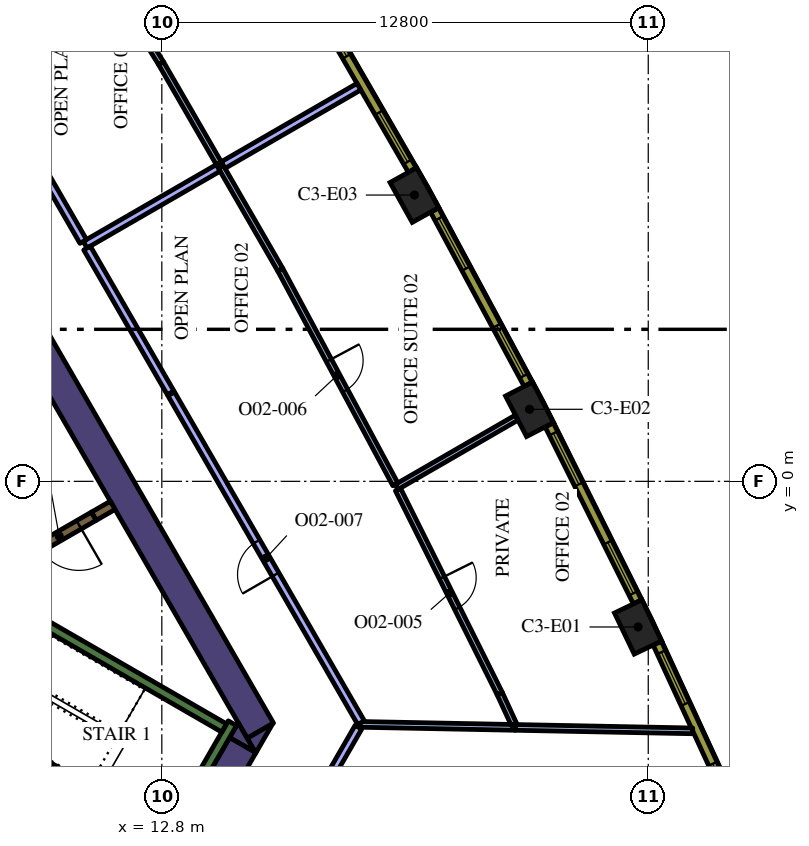
"""IFC4 building model, lengths in metres.
Left out: names, types, materials, properties, quantities, classifications, styles, units other than length and angle.
Written with IfcOpenShell. Run it as: python <this file> out.ifc"""

import sys

from ifc_helpers import new_model, si_unit, direction, frame, frame_2d, origin, origin_2d, place, context, subcontext, project, spatial, polyline, rectangle, outline, extrude, element, fill, save


model = new_model("IFC4")
c1 = context("Model", 3, precision=1e-05, world=origin(), true_north=direction((0.0, 1.0)))
c2 = subcontext(c1, "Body", "Model", "MODEL_VIEW")
j1 = project(units=[si_unit("LENGTHUNIT", "METRE"), si_unit("PLANEANGLEUNIT", "RADIAN")], contexts=[c1])
p1 = place(None, origin())
s1 = spatial("IfcSite", under=j1, at=p1, CompositionType="ELEMENT")
p2 = place(p1, origin())
s2 = spatial("IfcBuilding", under=s1, at=p2, CompositionType="ELEMENT")
p3 = place(p2, frame((0.0, 0.0, 158.4)))
s3 = spatial("IfcBuildingStorey", under=s2, at=p3, CompositionType="ELEMENT", Elevation=158.4)
for number, where, z_axis, x_axis in (
    (1, (25.332, -3.832, 0.0), (0.0, 0.0, 1.0), (-0.433, 0.902, 0.0)),
    (2, (22.476, 1.896, 0.0), (0.0, 0.0, 1.0), (-0.46, 0.888, 0.0)),
    (3, (19.447, 7.533, 0.0), (0.0, 0.0, 1.0), (-0.487, 0.874, 0.0)),
):
    element("IfcColumn", number, at=place(p3, frame(where, z_axis=z_axis, x_axis=x_axis)), inside=s3, PredefinedType="COLUMN", context=c2, shape_type="SweptSolid", body=[
        extrude(rectangle(XDim=1.2, YDim=0.8, at=origin_2d()), origin(), (0.0, 0.0, 1.0), 4.2),
    ])
p4 = place(p3, frame((9.129, 4.289, 0.0), z_axis=(0.0, 0.0, 1.0), x_axis=(0.499995742806, -0.866027861663, 0.0)))
e4 = element("IfcWall", 4, at=p4, inside=s3, PredefinedType="SOLIDWALL", context=c2, shape_type="SweptSolid", body=[
    extrude(rectangle(XDim=12.527, YDim=0.8, at=frame_2d((6.264, 0.0))), origin(), (0.0, 0.0, 1.0), 4.2),
])
p5 = place(p3, origin())
e5 = element("IfcWall", 5, at=p5, inside=s3, PredefinedType="SOLIDWALL", context=c2, shape_type="SweptSolid", body=[
    extrude(outline(polyline([(15.271, -7.15), (15.047, -6.762), (15.719, -6.374), (15.271, -7.15)])), origin(), (0.0, 0.0, 1.0), 4.2),
])
p6 = place(p3, frame((13.018, -10.252, 0.0), z_axis=(0.0, 0.0, 1.0), x_axis=(0.499984020225, 0.866034629516, 0.0)))
e6 = element("IfcWall", 6, at=p6, inside=s3, PredefinedType="SOLIDWALL", context=c2, shape_type="SweptSolid", body=[
    extrude(rectangle(XDim=3.824, YDim=0.8, at=frame_2d((1.912, 0.0))), origin(), (0.0, 0.0, 1.0), 4.2),
])
e7 = element("IfcWall", 7, at=p5, inside=s3, PredefinedType="SOLIDWALL", context=c2, shape_type="SweptSolid", body=[
    extrude(outline(polyline([(14.809, -6.35), (15.257, -7.126), (14.585, -6.738), (14.809, -6.35)])), origin(), (0.0, 0.0, 1.0), 4.2),
])
p7 = place(p3, frame((12.84, -9.511, 0.0), z_axis=(0.0, 0.0, 1.0), x_axis=(0.499997733992, 0.866026712061, 0.0)))
e8 = element("IfcWall", 8, at=p7, inside=s3, PredefinedType="SOLIDWALL", context=c2, shape_type="SweptSolid", body=[
    extrude(rectangle(XDim=3.634, YDim=0.25, at=frame_2d((1.817, 0.0))), origin(), (0.0, 0.0, 1.0), 4.2),
])
p8 = place(p3, frame((12.84, -9.261, 0.0), z_axis=(0.0, 0.0, 1.0), x_axis=(-0.866013990052, 0.500019768644, 0.0)))
e9 = element("IfcWall", 9, at=p8, inside=s3, PredefinedType="SOLIDWALL", context=c2, shape_type="SweptSolid", body=[
    extrude(rectangle(XDim=6.8, YDim=0.25, at=frame_2d((3.4, 0.0))), origin(), (0.0, 0.0, 1.0), 4.2),
])
p9 = place(p3, frame((8.334, -2.964, 0.0), z_axis=(0.0, 0.0, 1.0), x_axis=(0.866016039709, -0.500016218704, 0.0)))
e10 = element("IfcWall", 10, at=p9, inside=s3, PredefinedType="SOLIDWALL", context=c2, shape_type="SweptSolid", body=[
    extrude(rectangle(XDim=7.05, YDim=0.25, at=frame_2d((3.525, 0.0))), origin(), (0.0, 0.0, 1.0), 4.2),
])
p10 = place(p3, frame((11.507, -0.631, 0.0), z_axis=(0.0, 0.0, 1.0), x_axis=(-0.866093731455, -0.499881634324, 0.0)))
e11 = element("IfcWall", 11, at=p10, inside=s3, PredefinedType="SOLIDWALL", context=c2, shape_type="SweptSolid", body=[
    extrude(rectangle(XDim=0.575, YDim=0.25, at=frame_2d((0.288, 0.0))), origin(), (0.0, 0.0, 1.0), 4.2),
])
p11 = place(p3, frame((11.009, -0.919, 0.0), z_axis=(0.0, 0.0, 1.0), x_axis=(-0.866059744384, -0.49994051562, 0.0)))
e12 = element("IfcWall", 12, at=p11, inside=s3, PredefinedType="SOLIDWALL", context=c2, shape_type="SweptSolid", body=[
    extrude(rectangle(XDim=2.1, YDim=0.25, at=frame_2d((1.05, 0.0))), origin(), (0.0, 0.0, 1.0), 4.2),
])
p12 = place(p11, frame((0.45, 0.0, 0.0)))
e13 = element("IfcOpeningElement", 13, at=p12, cuts=e12, PredefinedType="OPENING", context=c2, shape_type="SweptSolid", body=[
    extrude(rectangle(XDim=1.2, YDim=2.1, at=frame_2d((0.6, 1.05))), frame((0.0, 0.135, 0.0), z_axis=(0.0, -1.0, 0.0), x_axis=(1.0, 0.0, 0.0)), (0.0, 0.0, 1.0), 0.27),
])
p13 = place(p3, frame((22.097, -6.474, 0.0), z_axis=(0.0, 0.0, 1.0), x_axis=(0.999810044283, -0.019490391268, 0.0)))
e14 = element("IfcWall", 14, at=p13, inside=s3, PredefinedType="PARTITIONING", context=c2, shape_type="SweptSolid", body=[
    extrude(rectangle(XDim=4.672, YDim=0.15, at=frame_2d((2.336, 0.0))), origin(), (0.0, 0.0, 1.0), 3.15),
])
p14 = place(p3, frame((18.016, -6.395, 0.0), z_axis=(0.0, 0.0, 1.0), x_axis=(0.999808348885, -0.019577167837, 0.0)))
e15 = element("IfcWall", 15, at=p14, inside=s3, PredefinedType="PARTITIONING", context=c2, shape_type="SweptSolid", body=[
    extrude(rectangle(XDim=4.09, YDim=0.15, at=frame_2d((2.045, 0.0))), origin(), (0.0, 0.0, 1.0), 3.15),
])
p15 = place(p3, frame((16.896, -8.335, 0.0), z_axis=(0.0, 0.0, 1.0), x_axis=(0.500026504619, 0.866010100794, 0.0)))
e16 = element("IfcWall", 16, at=p15, inside=s3, PredefinedType="PARTITIONING", context=c2, shape_type="SweptSolid", body=[
    extrude(rectangle(XDim=2.155, YDim=0.2, at=frame_2d((1.077, 0.0))), origin(), (0.0, 0.0, 1.0), 3.15),
])
p16 = place(p3, frame((18.98, -0.147, 0.0), z_axis=(0.0, 0.0, 1.0), x_axis=(0.866035116605, 0.499983176524, 0.0)))
e17 = element("IfcWall", 17, at=p16, inside=s3, PredefinedType="PARTITIONING", context=c2, shape_type="SweptSolid", body=[
    extrude(rectangle(XDim=3.648, YDim=0.15, at=frame_2d((1.824, 0.0))), origin(), (0.0, 0.0, 1.0), 3.15),
])
p17 = place(p3, frame((22.067, -6.399, 0.0), z_axis=(0.0, 0.0, 1.0), x_axis=(-0.418629119493, 0.908157288311, 0.0)))
e18 = element("IfcWall", 18, at=p17, inside=s3, PredefinedType="PARTITIONING", context=c2, shape_type="SweptSolid", body=[
    extrude(rectangle(XDim=0.902, YDim=0.15, at=frame_2d((0.451, 0.0))), origin(), (0.0, 0.0, 1.0), 3.15),
])
p18 = place(p3, frame((19.014, -0.214, 0.0), z_axis=(0.0, 0.0, 1.0), x_axis=(0.446219729364, -0.894923434225, 0.0)))
e19 = element("IfcWall", 19, at=p18, inside=s3, PredefinedType="PARTITIONING", context=c2, shape_type="SweptSolid", body=[
    extrude(rectangle(XDim=5.995, YDim=0.15, at=frame_2d((2.998, 0.0))), origin(), (0.0, 0.0, 1.0), 3.15),
])
p19 = place(p18, frame((2.595, 0.0, 0.0)))
e20 = element("IfcOpeningElement", 20, at=p19, cuts=e19, PredefinedType="OPENING", context=c2, shape_type="SweptSolid", body=[
    extrude(rectangle(XDim=0.9, YDim=2.1, at=frame_2d((0.45, 1.05))), frame((0.0, 0.085, 0.0), z_axis=(0.0, -1.0, 0.0), x_axis=(1.0, 0.0, 0.0)), (0.0, 0.0, 1.0), 0.17),
])
p20 = place(p3, frame((15.917, 5.566, 0.0), z_axis=(0.0, 0.0, 1.0), x_axis=(0.472485737981, -0.881338316088, 0.0)))
e21 = element("IfcWall", 21, at=p20, inside=s3, PredefinedType="PARTITIONING", context=c2, shape_type="SweptSolid", body=[
    extrude(rectangle(XDim=6.407, YDim=0.15, at=frame_2d((3.204, 0.0))), origin(), (0.0, 0.0, 1.0), 3.15),
])
p21 = place(p20, frame((2.707, 0.0, 0.0)))
e22 = element("IfcOpeningElement", 22, at=p21, cuts=e21, PredefinedType="OPENING", context=c2, shape_type="SweptSolid", body=[
    extrude(rectangle(XDim=0.9, YDim=2.1, at=frame_2d((0.45, 1.05))), frame((0.0, 0.085, 0.0), z_axis=(0.0, -1.0, 0.0), x_axis=(1.0, 0.0, 0.0)), (0.0, 0.0, 1.0), 0.17),
])
p22 = place(p3, frame((15.917, 5.566, 0.0), z_axis=(0.0, 0.0, 1.0), x_axis=(-0.499996312652, 0.866027532665, 0.0)))
e23 = element("IfcWall", 23, at=p22, inside=s3, PredefinedType="PARTITIONING", context=c2, shape_type="SweptSolid", body=[
    extrude(rectangle(XDim=3.138, YDim=0.15, at=frame_2d((1.569, 0.0))), origin(), (0.0, 0.0, 1.0), 3.15),
])
p23 = place(p3, frame((14.413, 8.322, 0.0), z_axis=(0.0, 0.0, 1.0), x_axis=(0.866034795751, 0.499983732284, 0.0)))
e24 = element("IfcWall", 24, at=p23, inside=s3, PredefinedType="PARTITIONING", context=c2, shape_type="SweptSolid", body=[
    extrude(rectangle(XDim=4.125, YDim=0.2, at=frame_2d((2.062, 0.0))), origin(), (0.0, 0.0, 1.0), 3.15),
])
p24 = place(p3, frame((10.782, 6.225, 0.0), z_axis=(0.0, 0.0, 1.0), x_axis=(0.866034752867, 0.499983806564, 0.0)))
e25 = element("IfcWall", 25, at=p24, inside=s3, PredefinedType="PARTITIONING", context=c2, shape_type="SweptSolid", body=[
    extrude(rectangle(XDim=4.043, YDim=0.2, at=frame_2d((2.021, 0.0))), origin(), (0.0, 0.0, 1.0), 3.15),
])
p25 = place(p3, frame((13.032, 2.328, 0.0), z_axis=(0.0, 0.0, 1.0), x_axis=(-0.499988222896, 0.866032203192, 0.0)))
e26 = element("IfcWall", 26, at=p25, inside=s3, PredefinedType="PARTITIONING", context=c2, shape_type="SweptSolid", body=[
    extrude(rectangle(XDim=4.4, YDim=0.2, at=frame_2d((2.2, 0.0))), origin(), (0.0, 0.0, 1.0), 3.15),
])
p26 = place(p3, frame((18.042, -6.35, 0.0), z_axis=(0.0, 0.0, 1.0), x_axis=(-0.499986873641, 0.866032982159, 0.0)))
e27 = element("IfcWall", 27, at=p26, inside=s3, PredefinedType="PARTITIONING", context=c2, shape_type="SweptSolid", body=[
    extrude(rectangle(XDim=9.99, YDim=0.2, at=frame_2d((4.995, 0.0))), origin(), (0.0, 0.0, 1.0), 3.15),
])
p27 = place(p26, frame((4.5, 0.0, 0.0)))
e28 = element("IfcOpeningElement", 28, at=p27, cuts=e27, PredefinedType="OPENING", context=c2, shape_type="SweptSolid", body=[
    extrude(rectangle(XDim=1.0, YDim=2.1, at=frame_2d((0.5, 1.05))), frame((0.0, 0.11, 0.0), z_axis=(0.0, -1.0, 0.0), x_axis=(1.0, 0.0, 0.0)), (0.0, 0.0, 1.0), 0.22),
])
p28 = place(p3, frame((14.299, 8.371, 0.0), z_axis=(0.0, 0.0, 1.0), x_axis=(-0.500019211527, 0.86601431172, 0.0)))
e29 = element("IfcWall", 29, at=p28, inside=s3, PredefinedType="PARTITIONING", context=c2, shape_type="SweptSolid", body=[
    extrude(rectangle(XDim=3.039, YDim=0.15, at=frame_2d((1.519, 0.0))), origin(), (0.0, 0.0, 1.0), 3.15),
])
p29 = place(p3, frame((9.403, 16.447, 0.0), z_axis=(0.0, 0.0, 1.0), x_axis=(0.527026092571, -0.849849102929, 0.0)))
e30 = element("IfcWall", 30, at=p29, inside=s3, PredefinedType="PARTITIONING", context=c2, shape_type="SweptSolid", body=[
    extrude(rectangle(XDim=6.407, YDim=0.15, at=frame_2d((3.204, 0.0))), origin(), (0.0, 0.0, 1.0), 3.15),
])
p30 = place(p29, frame((2.707, 0.0, 0.0)))
e31 = element("IfcOpeningElement", 31, at=p30, cuts=e30, PredefinedType="OPENING", context=c2, shape_type="SweptSolid", body=[
    extrude(rectangle(XDim=0.9, YDim=2.1, at=frame_2d((0.45, 1.05))), frame((0.0, 0.085, 0.0), z_axis=(0.0, -1.0, 0.0), x_axis=(1.0, 0.0, 0.0)), (0.0, 0.0, 1.0), 0.17),
])
p31 = place(p3, frame((10.732, 6.312, 0.0), z_axis=(0.0, 0.0, 1.0), x_axis=(-0.499984786451, 0.866034187153, 0.0)))
e32 = element("IfcWall", 32, at=p31, inside=s3, PredefinedType="PARTITIONING", context=c2, shape_type="SweptSolid", body=[
    extrude(rectangle(XDim=4.404, YDim=0.2, at=frame_2d((2.202, 0.0))), origin(), (0.0, 0.0, 1.0), 3.15),
])
p32 = place(p3, frame((28.02, -8.992, 0.0), z_axis=(0.0, 0.0, 1.0), x_axis=(-0.418722559465, 0.908114209885, 0.0)))
e33 = element("IfcWall", 33, at=p32, inside=s3, PredefinedType="SOLIDWALL", context=c2, shape_type="SweptSolid", body=[
    extrude(rectangle(XDim=5.213, YDim=0.24, at=frame_2d((2.606, 0.0))), origin(), (0.0, 0.0, 1.0), 3.95),
])
p33 = place(p32, frame((0.221, 0.0, 0.9)))
e34 = element("IfcOpeningElement", 34, at=p33, cuts=e33, PredefinedType="OPENING", context=c2, shape_type="SweptSolid", body=[
    extrude(rectangle(XDim=1.5, YDim=2.55, at=frame_2d((0.75, 1.275))), frame((0.0, 0.13, 0.0), z_axis=(0.0, -1.0, 0.0), x_axis=(1.0, 0.0, 0.0)), (0.0, 0.0, 1.0), 0.26),
])
p34 = place(p32, frame((3.452, 0.0, 0.9)))
e35 = element("IfcOpeningElement", 35, at=p34, cuts=e33, PredefinedType="OPENING", context=c2, shape_type="SweptSolid", body=[
    extrude(rectangle(XDim=1.5, YDim=2.55, at=frame_2d((0.75, 1.275))), frame((0.0, 0.13, 0.0), z_axis=(0.0, -1.0, 0.0), x_axis=(1.0, 0.0, 0.0)), (0.0, 0.0, 1.0), 0.26),
])
p35 = place(p3, frame((25.316, -3.171, 0.0), z_axis=(0.0, 0.0, 1.0), x_axis=(-0.446256171312, 0.8949052629, 0.0)))
e36 = element("IfcWall", 36, at=p35, inside=s3, PredefinedType="SOLIDWALL", context=c2, shape_type="SweptSolid", body=[
    extrude(rectangle(XDim=5.203, YDim=0.24, at=frame_2d((2.602, 0.0))), origin(), (0.0, 0.0, 1.0), 3.95),
])
p36 = place(p35, frame((0.248, 0.0, 0.9)))
e37 = element("IfcOpeningElement", 37, at=p36, cuts=e36, PredefinedType="OPENING", context=c2, shape_type="SweptSolid", body=[
    extrude(rectangle(XDim=1.5, YDim=2.55, at=frame_2d((0.75, 1.275))), frame((0.0, 0.13, 0.0), z_axis=(0.0, -1.0, 0.0), x_axis=(1.0, 0.0, 0.0)), (0.0, 0.0, 1.0), 0.26),
])
p37 = place(p35, frame((3.455, 0.0, 0.9)))
e38 = element("IfcOpeningElement", 38, at=p37, cuts=e36, PredefinedType="OPENING", context=c2, shape_type="SweptSolid", body=[
    extrude(rectangle(XDim=1.5, YDim=2.55, at=frame_2d((0.75, 1.275))), frame((0.0, 0.13, 0.0), z_axis=(0.0, -1.0, 0.0), x_axis=(1.0, 0.0, 0.0)), (0.0, 0.0, 1.0), 0.26),
])
p38 = place(p3, frame((22.44, 2.555, 0.0), z_axis=(0.0, 0.0, 1.0), x_axis=(-0.473349833294, 0.880874528704, 0.0)))
e39 = element("IfcWall", 39, at=p38, inside=s3, PredefinedType="SOLIDWALL", context=c2, shape_type="SweptSolid", body=[
    extrude(rectangle(XDim=5.204, YDim=0.24, at=frame_2d((2.602, 0.0))), origin(), (0.0, 0.0, 1.0), 3.95),
])
p39 = place(p38, frame((0.248, 0.0, 0.9)))
e40 = element("IfcOpeningElement", 40, at=p39, cuts=e39, PredefinedType="OPENING", context=c2, shape_type="SweptSolid", body=[
    extrude(rectangle(XDim=1.5, YDim=2.55, at=frame_2d((0.75, 1.275))), frame((0.0, 0.13, 0.0), z_axis=(0.0, -1.0, 0.0), x_axis=(1.0, 0.0, 0.0)), (0.0, 0.0, 1.0), 0.26),
])
p40 = place(p38, frame((3.455, 0.0, 0.9)))
e41 = element("IfcOpeningElement", 41, at=p40, cuts=e39, PredefinedType="OPENING", context=c2, shape_type="SweptSolid", body=[
    extrude(rectangle(XDim=1.5, YDim=2.55, at=frame_2d((0.75, 1.275))), frame((0.0, 0.13, 0.0), z_axis=(0.0, -1.0, 0.0), x_axis=(1.0, 0.0, 0.0)), (0.0, 0.0, 1.0), 0.26),
])
p41 = place(p3, frame((19.391, 8.191, 0.0), z_axis=(0.0, 0.0, 1.0), x_axis=(-0.500009456303, 0.866019944116, 0.0)))
e42 = element("IfcWall", 42, at=p41, inside=s3, PredefinedType="SOLIDWALL", context=c2, shape_type="SweptSolid", body=[
    extrude(rectangle(XDim=5.204, YDim=0.24, at=frame_2d((2.602, 0.0))), origin(), (0.0, 0.0, 1.0), 3.95),
])
p42 = place(p41, frame((0.248, 0.0, 0.9)))
e43 = element("IfcOpeningElement", 43, at=p42, cuts=e42, PredefinedType="OPENING", context=c2, shape_type="SweptSolid", body=[
    extrude(rectangle(XDim=1.5, YDim=2.55, at=frame_2d((0.75, 1.275))), frame((0.0, 0.13, 0.0), z_axis=(0.0, -1.0, 0.0), x_axis=(1.0, 0.0, 0.0)), (0.0, 0.0, 1.0), 0.26),
])
p43 = place(p41, frame((3.455, 0.0, 0.9)))
e44 = element("IfcOpeningElement", 44, at=p43, cuts=e42, PredefinedType="OPENING", context=c2, shape_type="SweptSolid", body=[
    extrude(rectangle(XDim=1.5, YDim=2.55, at=frame_2d((0.75, 1.275))), frame((0.0, 0.13, 0.0), z_axis=(0.0, -1.0, 0.0), x_axis=(1.0, 0.0, 0.0)), (0.0, 0.0, 1.0), 0.26),
])
p44 = place(p12, origin())
e45 = element("IfcDoor", 45, at=p44, inside=s3, OperationType="SINGLE_SWING_LEFT", PredefinedType="DOOR", context=c2, shape_type="SweptSolid", body=[
    extrude(rectangle(XDim=1.2, YDim=2.1, at=frame_2d((0.6, 1.05))), frame((0.0, 0.025, 0.0), z_axis=(0.0, -1.0, 0.0), x_axis=(1.0, 0.0, 0.0)), (0.0, 0.0, 1.0), 0.05),
])
fill(e13, e45)
p45 = place(p19, origin())
e46 = element("IfcDoor", 46, at=p45, inside=s3, OperationType="SINGLE_SWING_RIGHT", PredefinedType="DOOR", context=c2, shape_type="SweptSolid", body=[
    extrude(rectangle(XDim=0.9, YDim=2.1, at=frame_2d((0.45, 1.05))), frame((0.0, 0.025, 0.0), z_axis=(0.0, -1.0, 0.0), x_axis=(1.0, 0.0, 0.0)), (0.0, 0.0, 1.0), 0.05),
])
fill(e20, e46)
p46 = place(p21, origin())
e47 = element("IfcDoor", 47, at=p46, inside=s3, OperationType="SINGLE_SWING_LEFT", PredefinedType="DOOR", context=c2, shape_type="SweptSolid", body=[
    extrude(rectangle(XDim=0.9, YDim=2.1, at=frame_2d((0.45, 1.05))), frame((0.0, 0.025, 0.0), z_axis=(0.0, -1.0, 0.0), x_axis=(1.0, 0.0, 0.0)), (0.0, 0.0, 1.0), 0.05),
])
fill(e22, e47)
p47 = place(p27, origin())
e48 = element("IfcDoor", 48, at=p47, inside=s3, OperationType="SINGLE_SWING_RIGHT", PredefinedType="DOOR", context=c2, shape_type="SweptSolid", body=[
    extrude(rectangle(XDim=1.0, YDim=2.1, at=frame_2d((0.5, 1.05))), frame((0.0, 0.025, 0.0), z_axis=(0.0, -1.0, 0.0), x_axis=(1.0, 0.0, 0.0)), (0.0, 0.0, 1.0), 0.05),
])
fill(e28, e48)
p48 = place(p33, origin())
e49 = element("IfcWindow", 49, at=p48, inside=s3, PartitioningType="SINGLE_PANEL", PredefinedType="WINDOW", context=c2, shape_type="SweptSolid", body=[
    extrude(rectangle(XDim=1.5, YDim=2.55, at=frame_2d((0.75, 1.275))), frame((0.0, 0.04, 0.0), z_axis=(0.0, -1.0, 0.0), x_axis=(1.0, 0.0, 0.0)), (0.0, 0.0, 1.0), 0.06),
])
fill(e34, e49)
p49 = place(p34, origin())
e50 = element("IfcWindow", 50, at=p49, inside=s3, PartitioningType="SINGLE_PANEL", PredefinedType="WINDOW", context=c2, shape_type="SweptSolid", body=[
    extrude(rectangle(XDim=1.5, YDim=2.55, at=frame_2d((0.75, 1.275))), frame((0.0, 0.04, 0.0), z_axis=(0.0, -1.0, 0.0), x_axis=(1.0, 0.0, 0.0)), (0.0, 0.0, 1.0), 0.06),
])
fill(e35, e50)
p50 = place(p36, origin())
e51 = element("IfcWindow", 51, at=p50, inside=s3, PartitioningType="SINGLE_PANEL", PredefinedType="WINDOW", context=c2, shape_type="SweptSolid", body=[
    extrude(rectangle(XDim=1.5, YDim=2.55, at=frame_2d((0.75, 1.275))), frame((0.0, 0.04, 0.0), z_axis=(0.0, -1.0, 0.0), x_axis=(1.0, 0.0, 0.0)), (0.0, 0.0, 1.0), 0.06),
])
fill(e37, e51)
p51 = place(p37, origin())
e52 = element("IfcWindow", 52, at=p51, inside=s3, PartitioningType="SINGLE_PANEL", PredefinedType="WINDOW", context=c2, shape_type="SweptSolid", body=[
    extrude(rectangle(XDim=1.5, YDim=2.55, at=frame_2d((0.75, 1.275))), frame((0.0, 0.04, 0.0), z_axis=(0.0, -1.0, 0.0), x_axis=(1.0, 0.0, 0.0)), (0.0, 0.0, 1.0), 0.06),
])
fill(e38, e52)
p52 = place(p39, origin())
e53 = element("IfcWindow", 53, at=p52, inside=s3, PartitioningType="SINGLE_PANEL", PredefinedType="WINDOW", context=c2, shape_type="SweptSolid", body=[
    extrude(rectangle(XDim=1.5, YDim=2.55, at=frame_2d((0.75, 1.275))), frame((0.0, 0.04, 0.0), z_axis=(0.0, -1.0, 0.0), x_axis=(1.0, 0.0, 0.0)), (0.0, 0.0, 1.0), 0.06),
])
fill(e40, e53)
p53 = place(p40, origin())
e54 = element("IfcWindow", 54, at=p53, inside=s3, PartitioningType="SINGLE_PANEL", PredefinedType="WINDOW", context=c2, shape_type="SweptSolid", body=[
    extrude(rectangle(XDim=1.5, YDim=2.55, at=frame_2d((0.75, 1.275))), frame((0.0, 0.04, 0.0), z_axis=(0.0, -1.0, 0.0), x_axis=(1.0, 0.0, 0.0)), (0.0, 0.0, 1.0), 0.06),
])
fill(e41, e54)
p54 = place(p42, origin())
e55 = element("IfcWindow", 55, at=p54, inside=s3, PartitioningType="SINGLE_PANEL", PredefinedType="WINDOW", context=c2, shape_type="SweptSolid", body=[
    extrude(rectangle(XDim=1.5, YDim=2.55, at=frame_2d((0.75, 1.275))), frame((0.0, 0.04, 0.0), z_axis=(0.0, -1.0, 0.0), x_axis=(1.0, 0.0, 0.0)), (0.0, 0.0, 1.0), 0.06),
])
fill(e43, e55)
p55 = place(p43, origin())
e56 = element("IfcWindow", 56, at=p55, inside=s3, PartitioningType="SINGLE_PANEL", PredefinedType="WINDOW", context=c2, shape_type="SweptSolid", body=[
    extrude(rectangle(XDim=1.5, YDim=2.55, at=frame_2d((0.75, 1.275))), frame((0.0, 0.04, 0.0), z_axis=(0.0, -1.0, 0.0), x_axis=(1.0, 0.0, 0.0)), (0.0, 0.0, 1.0), 0.06),
])
fill(e44, e56)
save(model, sys.argv[1])
